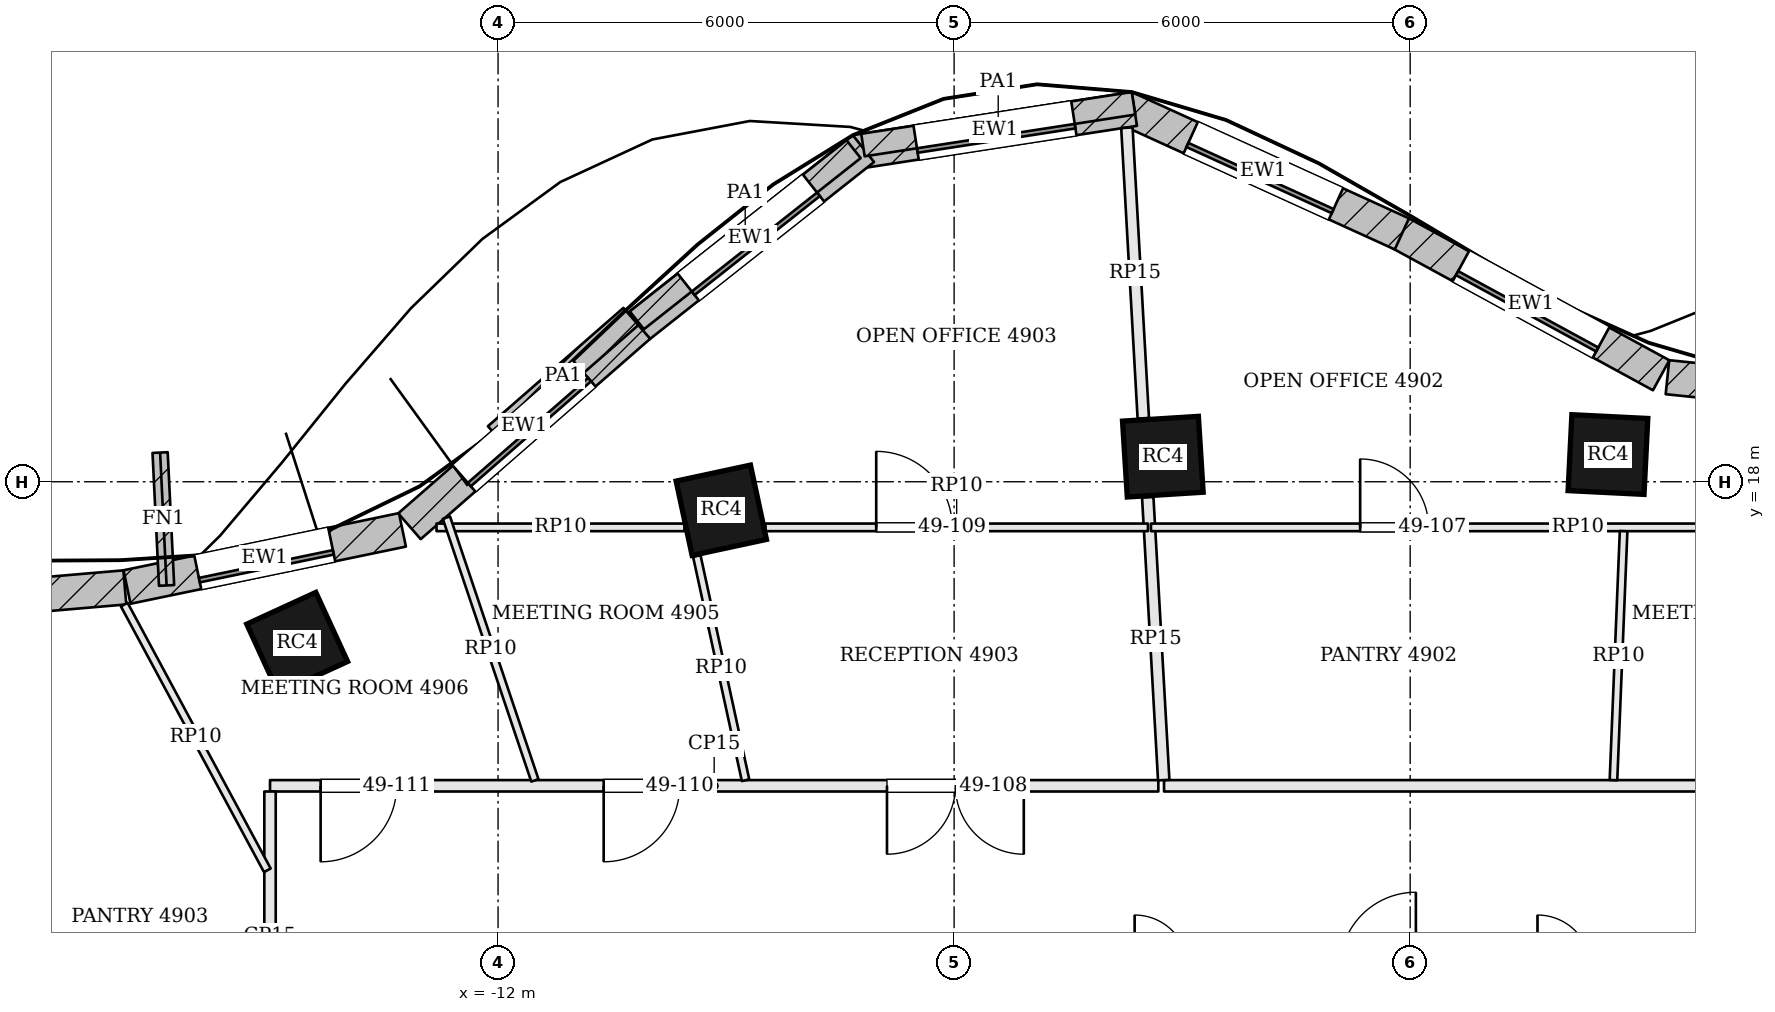
"""IFC4 building model, lengths in metres.
Left out: names, types, materials, properties, quantities, classifications, styles, units other than length and angle.
Written with IfcOpenShell. Run it as: python <this file> out.ifc"""

import sys

from ifc_helpers import new_model, si_unit, direction, frame, frame_2d, origin, origin_2d, place, context, subcontext, project, spatial, rectangle, extrude, element, fill, save


model = new_model("IFC4")
c1 = context("Model", 3, precision=1e-05, world=origin(), true_north=direction((0.0, 1.0)))
c2 = subcontext(c1, "Body", "Model", "MODEL_VIEW")
j1 = project(units=[si_unit("LENGTHUNIT", "METRE"), si_unit("PLANEANGLEUNIT", "RADIAN")], contexts=[c1])
p1 = place(None, origin())
s1 = spatial("IfcSite", under=j1, at=p1, CompositionType="ELEMENT")
p2 = place(p1, origin())
s2 = spatial("IfcBuilding", under=s1, at=p2, CompositionType="ELEMENT")
p3 = place(p2, frame((0.0, 0.0, 201.3)))
s3 = spatial("IfcBuildingStorey", under=s2, at=p3, CompositionType="ELEMENT", Elevation=201.3)
for number, where, z_axis, x_axis in (
    (1, (2.602, 18.358, 0.0), (0.0, 0.0, 1.0), (-0.999, 0.05, 0.0)),
    (2, (-3.254, 18.33, 0.0), (0.0, 0.0, 1.0), (-0.998, -0.063, 0.0)),
    (3, (-9.063, 17.625, 0.0), (0.0, 0.0, 1.0), (-0.978, -0.21, 0.0)),
    (4, (-14.643, 15.881, 0.0), (0.0, 0.0, 1.0), (-0.909, -0.417, 0.0)),
):
    element("IfcColumn", number, at=place(p3, frame(where, z_axis=z_axis, x_axis=x_axis)), inside=s3, PredefinedType="COLUMN", context=c2, shape_type="SweptSolid", body=[
        extrude(rectangle(XDim=1.0, YDim=1.0, at=origin_2d()), origin(), (0.0, 0.0, 1.0), 3.9),
    ])
p4 = place(p3, frame((6.04, 19.101, 0.0), z_axis=(0.0, 0.0, 1.0), x_axis=(-0.994675968472, 0.103052014752, 0.0)))
e5 = element("IfcWall", 5, at=p4, inside=s3, PredefinedType="SOLIDWALL", context=c2, shape_type="SweptSolid", body=[
    extrude(rectangle(XDim=2.67, YDim=0.45, at=frame_2d((1.335, 0.0))), origin(), (0.0, 0.0, 1.0), 3.7),
])
p5 = place(p4, frame((0.435, 0.0, 0.9)))
e6 = element("IfcOpeningElement", 6, at=p5, cuts=e5, PredefinedType="OPENING", context=c2, shape_type="SweptSolid", body=[
    extrude(rectangle(XDim=1.8, YDim=2.3, at=frame_2d((0.9, 1.15))), frame((0.0, 0.235, 0.0), z_axis=(0.0, -1.0, 0.0), x_axis=(1.0, 0.0, 0.0)), (0.0, 0.0, 1.0), 0.47),
])
p6 = place(p3, frame((3.302, 19.401, 0.0), z_axis=(0.0, 0.0, 1.0), x_axis=(-0.878060540763, 0.47854956562, 0.0)))
e7 = element("IfcWall", 7, at=p6, inside=s3, PredefinedType="SOLIDWALL", context=c2, shape_type="SweptSolid", body=[
    extrude(rectangle(XDim=3.901, YDim=0.45, at=frame_2d((1.951, 0.0))), origin(), (0.0, 0.0, 1.0), 3.7),
])
p7 = place(p6, frame((0.901, 0.0, 0.9)))
e8 = element("IfcOpeningElement", 8, at=p7, cuts=e7, PredefinedType="OPENING", context=c2, shape_type="SweptSolid", body=[
    extrude(rectangle(XDim=2.1, YDim=2.3, at=frame_2d((1.05, 1.15))), frame((0.0, 0.235, 0.0), z_axis=(0.0, -1.0, 0.0), x_axis=(1.0, 0.0, 0.0)), (0.0, 0.0, 1.0), 0.47),
])
p8 = place(p3, frame((-0.109, 21.261, 0.0), z_axis=(0.0, 0.0, 1.0), x_axis=(-0.910040573706, 0.414519184367, 0.0)))
e9 = element("IfcWall", 9, at=p8, inside=s3, PredefinedType="SOLIDWALL", context=c2, shape_type="SweptSolid", body=[
    extrude(rectangle(XDim=4.006, YDim=0.45, at=frame_2d((2.003, 0.0))), origin(), (0.0, 0.0, 1.0), 3.7),
])
p9 = place(p8, frame((0.953, 0.0, 0.9)))
e10 = element("IfcOpeningElement", 10, at=p9, cuts=e9, PredefinedType="OPENING", context=c2, shape_type="SweptSolid", body=[
    extrude(rectangle(XDim=2.1, YDim=2.3, at=frame_2d((1.05, 1.15))), frame((0.0, 0.235, 0.0), z_axis=(0.0, -1.0, 0.0), x_axis=(1.0, 0.0, 0.0)), (0.0, 0.0, 1.0), 0.47),
])
p10 = place(p3, frame((-3.629, 22.905, 0.0), z_axis=(0.0, 0.0, 1.0), x_axis=(-0.988300084321, -0.152521943772, 0.0)))
e11 = element("IfcWall", 11, at=p10, inside=s3, PredefinedType="SOLIDWALL", context=c2, shape_type="SweptSolid", body=[
    extrude(rectangle(XDim=3.71, YDim=0.45, at=frame_2d((1.855, 0.0))), origin(), (0.0, 0.0, 1.0), 3.7),
])
p11 = place(p10, frame((0.805, 0.0, 0.9)))
e12 = element("IfcOpeningElement", 12, at=p11, cuts=e11, PredefinedType="OPENING", context=c2, shape_type="SweptSolid", body=[
    extrude(rectangle(XDim=2.1, YDim=2.3, at=frame_2d((1.05, 1.15))), frame((0.0, 0.235, 0.0), z_axis=(0.0, -1.0, 0.0), x_axis=(1.0, 0.0, 0.0)), (0.0, 0.0, 1.0), 0.47),
])
p12 = place(p3, frame((-7.193, 22.383, 0.0), z_axis=(0.0, 0.0, 1.0), x_axis=(-0.784803291184, -0.619744942816, 0.0)))
e13 = element("IfcWall", 13, at=p12, inside=s3, PredefinedType="SOLIDWALL", context=c2, shape_type="SweptSolid", body=[
    extrude(rectangle(XDim=3.775, YDim=0.45, at=frame_2d((1.887, 0.0))), origin(), (0.0, 0.0, 1.0), 3.7),
])
p13 = place(p12, frame((0.837, 0.0, 0.9)))
e14 = element("IfcOpeningElement", 14, at=p13, cuts=e13, PredefinedType="OPENING", context=c2, shape_type="SweptSolid", body=[
    extrude(rectangle(XDim=2.1, YDim=2.3, at=frame_2d((1.05, 1.15))), frame((0.0, 0.235, 0.0), z_axis=(0.0, -1.0, 0.0), x_axis=(1.0, 0.0, 0.0)), (0.0, 0.0, 1.0), 0.47),
])
p14 = place(p3, frame((-10.146, 20.051, 0.0), z_axis=(0.0, 0.0, 1.0), x_axis=(-0.753278140428, -0.657702093013, 0.0)))
e15 = element("IfcWall", 15, at=p14, inside=s3, PredefinedType="SOLIDWALL", context=c2, shape_type="SweptSolid", body=[
    extrude(rectangle(XDim=4.008, YDim=0.45, at=frame_2d((2.004, 0.0))), origin(), (0.0, 0.0, 1.0), 3.7),
])
p15 = place(p14, frame((0.954, 0.0, 0.9)))
e16 = element("IfcOpeningElement", 16, at=p15, cuts=e15, PredefinedType="OPENING", context=c2, shape_type="SweptSolid", body=[
    extrude(rectangle(XDim=2.1, YDim=2.3, at=frame_2d((1.05, 1.15))), frame((0.0, 0.235, 0.0), z_axis=(0.0, -1.0, 0.0), x_axis=(1.0, 0.0, 0.0)), (0.0, 0.0, 1.0), 0.47),
])
p16 = place(p3, frame((-13.258, 17.367, 0.0), z_axis=(0.0, 0.0, 1.0), x_axis=(-0.97914968674, -0.203140077183, 0.0)))
e17 = element("IfcWall", 17, at=p16, inside=s3, PredefinedType="SOLIDWALL", context=c2, shape_type="SweptSolid", body=[
    extrude(rectangle(XDim=3.7, YDim=0.45, at=frame_2d((1.85, 0.0))), origin(), (0.0, 0.0, 1.0), 3.7),
])
p17 = place(p16, frame((0.95, 0.0, 0.9)))
e18 = element("IfcOpeningElement", 18, at=p17, cuts=e17, PredefinedType="OPENING", context=c2, shape_type="SweptSolid", body=[
    extrude(rectangle(XDim=1.8, YDim=2.3, at=frame_2d((0.9, 1.15))), frame((0.0, 0.235, 0.0), z_axis=(0.0, -1.0, 0.0), x_axis=(1.0, 0.0, 0.0)), (0.0, 0.0, 1.0), 0.47),
])
p18 = place(p3, frame((-16.91, 16.61, 0.0), z_axis=(0.0, 0.0, 1.0), x_axis=(-0.996333165816, -0.085558299972, 0.0)))
e19 = element("IfcWall", 19, at=p18, inside=s3, PredefinedType="SOLIDWALL", context=c2, shape_type="SweptSolid", body=[
    extrude(rectangle(XDim=5.596, YDim=0.45, at=frame_2d((2.798, 0.0))), origin(), (0.0, 0.0, 1.0), 3.7),
])
p19 = place(p18, frame((1.748, 0.0, 0.9)))
e20 = element("IfcOpeningElement", 20, at=p19, cuts=e19, PredefinedType="OPENING", context=c2, shape_type="SweptSolid", body=[
    extrude(rectangle(XDim=2.1, YDim=2.3, at=frame_2d((1.05, 1.15))), frame((0.0, 0.235, 0.0), z_axis=(0.0, -1.0, 0.0), x_axis=(1.0, 0.0, 0.0)), (0.0, 0.0, 1.0), 0.47),
])
p20 = place(p3, frame((-16.361, 16.636, 0.0), z_axis=(0.0, 0.0, 1.0), x_axis=(-0.048552811097, 0.998820616795, 0.0)))
e21 = element("IfcWall", 21, at=p20, inside=s3, PredefinedType="SOLIDWALL", context=c2, shape_type="SweptSolid", body=[
    extrude(rectangle(XDim=1.75, YDim=0.2, at=frame_2d((0.875, 0.0))), origin(), (0.0, 0.0, 1.0), 3.7),
])
p21 = place(p3, frame((-3.64, 22.979, 3.9), z_axis=(0.0, 0.0, 1.0), x_axis=(-0.988299486994, -0.152525814235, 0.0)))
e22 = element("IfcWall", 22, at=p21, inside=s3, PredefinedType="PARAPET", context=c2, shape_type="SweptSolid", body=[
    extrude(rectangle(XDim=3.602, YDim=0.3, at=frame_2d((1.801, 0.0))), origin(), (0.0, 0.0, 1.0), 1.1),
])
p22 = place(p3, frame((-7.323, 22.376, 3.9), z_axis=(0.0, 0.0, 1.0), x_axis=(-0.784819122577, -0.61972489448, 0.0)))
e23 = element("IfcWall", 23, at=p22, inside=s3, PredefinedType="PARAPET", context=c2, shape_type="SweptSolid", body=[
    extrude(rectangle(XDim=3.633, YDim=0.3, at=frame_2d((1.817, 0.0))), origin(), (0.0, 0.0, 1.0), 1.1),
])
p23 = place(p3, frame((-10.252, 20.174, 3.9), z_axis=(0.0, 0.0, 1.0), x_axis=(-0.753260147018, -0.657722700622, 0.0)))
e24 = element("IfcWall", 24, at=p23, inside=s3, PredefinedType="PARAPET", context=c2, shape_type="SweptSolid", body=[
    extrude(rectangle(XDim=2.366, YDim=0.3, at=frame_2d((1.183, 0.0))), origin(), (0.0, 0.0, 1.0), 1.1),
])
p24 = place(p3, frame((12.494, 14.0, 0.0), z_axis=(0.0, 0.0, 1.0), x_axis=(-1.0, 0.0, 0.0)))
e25 = element("IfcWall", 25, at=p24, inside=s3, PredefinedType="PARTITIONING", context=c2, shape_type="SweptSolid", body=[
    extrude(rectangle(XDim=15.733, YDim=0.15, at=frame_2d((7.866, 0.0))), origin(), (0.0, 0.0, 1.0), 3.084),
])
p25 = place(p24, frame((2.371, 0.0, 0.0)))
e26 = element("IfcOpeningElement", 26, at=p25, cuts=e25, PredefinedType="OPENING", context=c2, shape_type="SweptSolid", body=[
    extrude(rectangle(XDim=1.8, YDim=2.1, at=frame_2d((0.9, 1.05))), frame((0.0, 0.085, 0.0), z_axis=(0.0, -1.0, 0.0), x_axis=(1.0, 0.0, 0.0)), (0.0, 0.0, 1.0), 0.17),
])
p26 = place(p24, frame((7.72, 0.0, 0.0)))
e27 = element("IfcOpeningElement", 27, at=p26, cuts=e25, PredefinedType="OPENING", context=c2, shape_type="SweptSolid", body=[
    extrude(rectangle(XDim=1.0, YDim=2.4, at=frame_2d((0.5, 1.2))), frame((0.0, 0.085, 0.0), z_axis=(0.0, -1.0, 0.0), x_axis=(1.0, 0.0, 0.0)), (0.0, 0.0, 1.0), 0.17),
])
p27 = place(p3, frame((-3.727, 22.657, 0.0), z_axis=(0.0, 0.0, 1.0), x_axis=(0.056374181452, -0.998409711324, 0.0)))
e28 = element("IfcWall", 28, at=p27, inside=s3, PredefinedType="PARTITIONING", context=c2, shape_type="SweptSolid", body=[
    extrude(rectangle(XDim=3.828, YDim=0.15, at=frame_2d((1.914, 0.0))), origin(), (0.0, 0.0, 1.0), 3.084),
])
p28 = place(p3, frame((-3.452, 17.796, 0.0), z_axis=(0.0, 0.0, 1.0), x_axis=(0.056329758448, -0.998412218632, 0.0)))
e29 = element("IfcWall", 29, at=p28, inside=s3, PredefinedType="PARTITIONING", context=c2, shape_type="SweptSolid", body=[
    extrude(rectangle(XDim=3.727, YDim=0.15, at=frame_2d((1.864, 0.0))), origin(), (0.0, 0.0, 1.0), 3.084),
])
p29 = place(p3, frame((-3.313, 14.0, 0.0), z_axis=(0.0, 0.0, 1.0), x_axis=(-1.0, 0.0, 0.0)))
e30 = element("IfcWall", 30, at=p29, inside=s3, PredefinedType="PARTITIONING", context=c2, shape_type="SweptSolid", body=[
    extrude(rectangle(XDim=11.687, YDim=0.15, at=frame_2d((5.843, 0.0))), origin(), (0.0, 0.0, 1.0), 3.084),
])
p30 = place(p29, frame((1.77, 0.0, 0.0)))
e31 = element("IfcOpeningElement", 31, at=p30, cuts=e30, PredefinedType="OPENING", context=c2, shape_type="SweptSolid", body=[
    extrude(rectangle(XDim=1.8, YDim=2.1, at=frame_2d((0.9, 1.05))), frame((0.0, 0.085, 0.0), z_axis=(0.0, -1.0, 0.0), x_axis=(1.0, 0.0, 0.0)), (0.0, 0.0, 1.0), 0.17),
])
p31 = place(p29, frame((6.297, 0.0, 0.0)))
e32 = element("IfcOpeningElement", 32, at=p31, cuts=e30, PredefinedType="OPENING", context=c2, shape_type="SweptSolid", body=[
    extrude(rectangle(XDim=1.0, YDim=2.4, at=frame_2d((0.5, 1.2))), frame((0.0, 0.085, 0.0), z_axis=(0.0, -1.0, 0.0), x_axis=(1.0, 0.0, 0.0)), (0.0, 0.0, 1.0), 0.17),
])
p32 = place(p29, frame((10.021, 0.0, 0.0)))
e33 = element("IfcOpeningElement", 33, at=p32, cuts=e30, PredefinedType="OPENING", context=c2, shape_type="SweptSolid", body=[
    extrude(rectangle(XDim=1.0, YDim=2.4, at=frame_2d((0.5, 1.2))), frame((0.0, 0.085, 0.0), z_axis=(0.0, -1.0, 0.0), x_axis=(1.0, 0.0, 0.0)), (0.0, 0.0, 1.0), 0.17),
])
p33 = place(p3, frame((-15.0, 13.925, 0.0), z_axis=(0.0, 0.0, 1.0), x_axis=(0.0, -1.0, 0.0)))
e34 = element("IfcWall", 34, at=p33, inside=s3, PredefinedType="PARTITIONING", context=c2, shape_type="SweptSolid", body=[
    extrude(rectangle(XDim=3.803, YDim=0.15, at=frame_2d((1.902, 0.0))), origin(), (0.0, 0.0, 1.0), 3.084),
])
p34 = place(p33, frame((1.85, 0.0, 0.0)))
e35 = element("IfcOpeningElement", 35, at=p34, cuts=e34, PredefinedType="OPENING", context=c2, shape_type="SweptSolid", body=[
    extrude(rectangle(XDim=1.0, YDim=2.1, at=frame_2d((0.5, 1.05))), frame((0.0, 0.085, 0.0), z_axis=(0.0, -1.0, 0.0), x_axis=(1.0, 0.0, 0.0)), (0.0, 0.0, 1.0), 0.17),
])
p35 = place(p3, frame((-19.21, 12.435, 0.0), z_axis=(0.0, 0.0, 1.0), x_axis=(0.663120249496, -0.748512882125, 0.0)))
e36 = element("IfcWall", 36, at=p35, inside=s3, PredefinedType="PARTITIONING", context=c2, shape_type="SweptSolid", body=[
    extrude(rectangle(XDim=4.414, YDim=0.15, at=frame_2d((2.207, 0.0))), origin(), (0.0, 0.0, 1.0), 3.084),
])
p36 = place(p3, frame((-3.41, 17.4, 0.0), z_axis=(0.0, 0.0, 1.0), x_axis=(1.0, 0.0, 0.0)))
e37 = element("IfcWall", 37, at=p36, inside=s3, PredefinedType="PARTITIONING", context=c2, shape_type="SweptSolid", body=[
    extrude(rectangle(XDim=11.235, YDim=0.1, at=frame_2d((5.617, 0.0))), origin(), (0.0, 0.0, 1.0), 3.084),
])
p37 = place(p36, frame((2.752, 0.0, 0.0)))
e38 = element("IfcOpeningElement", 38, at=p37, cuts=e37, PredefinedType="OPENING", context=c2, shape_type="SweptSolid", body=[
    extrude(rectangle(XDim=0.9, YDim=2.1, at=frame_2d((0.45, 1.05))), frame((0.0, 0.06, 0.0), z_axis=(0.0, -1.0, 0.0), x_axis=(1.0, 0.0, 0.0)), (0.0, 0.0, 1.0), 0.12),
])
p38 = place(p3, frame((2.675, 14.075, 0.0), z_axis=(0.0, 0.0, 1.0), x_axis=(0.040667038657, 0.999172753815, 0.0)))
e39 = element("IfcWall", 39, at=p38, inside=s3, PredefinedType="PARTITIONING", context=c2, shape_type="SweptSolid", body=[
    extrude(rectangle(XDim=3.278, YDim=0.1, at=frame_2d((1.639, 0.0))), origin(), (0.0, 0.0, 1.0), 3.084),
])
p39 = place(p3, frame((-12.81, 17.4, 0.0), z_axis=(0.0, 0.0, 1.0), x_axis=(1.0, 0.0, 0.0)))
e40 = element("IfcWall", 40, at=p39, inside=s3, PredefinedType="PARTITIONING", context=c2, shape_type="SweptSolid", body=[
    extrude(rectangle(XDim=3.263, YDim=0.1, at=frame_2d((1.632, 0.0))), origin(), (0.0, 0.0, 1.0), 3.084),
])
p40 = place(p3, frame((-8.483, 17.4, 0.0), z_axis=(0.0, 0.0, 1.0), x_axis=(1.0, 0.0, 0.0)))
e41 = element("IfcWall", 41, at=p40, inside=s3, PredefinedType="PARTITIONING", context=c2, shape_type="SweptSolid", body=[
    extrude(rectangle(XDim=5.032, YDim=0.1, at=frame_2d((2.516, 0.0))), origin(), (0.0, 0.0, 1.0), 3.084),
])
p41 = place(p40, frame((1.458, 0.0, 0.0)))
e42 = element("IfcOpeningElement", 42, at=p41, cuts=e41, PredefinedType="OPENING", context=c2, shape_type="SweptSolid", body=[
    extrude(rectangle(XDim=1.0, YDim=2.1, at=frame_2d((0.5, 1.05))), frame((0.0, 0.06, 0.0), z_axis=(0.0, -1.0, 0.0), x_axis=(1.0, 0.0, 0.0)), (0.0, 0.0, 1.0), 0.12),
])
p42 = place(p3, frame((-8.744, 14.073, 0.0), z_axis=(0.0, 0.0, 1.0), x_axis=(-0.21249342495, 0.977162496391, 0.0)))
e43 = element("IfcWall", 43, at=p42, inside=s3, PredefinedType="PARTITIONING", context=c2, shape_type="SweptSolid", body=[
    extrude(rectangle(XDim=3.019, YDim=0.1, at=frame_2d((1.51, 0.0))), origin(), (0.0, 0.0, 1.0), 3.084),
])
p43 = place(p3, frame((-11.515, 14.071, 0.0), z_axis=(0.0, 0.0, 1.0), x_axis=(-0.31905751642, 0.947735353997, 0.0)))
e44 = element("IfcWall", 44, at=p43, inside=s3, PredefinedType="PARTITIONING", context=c2, shape_type="SweptSolid", body=[
    extrude(rectangle(XDim=3.648, YDim=0.1, at=frame_2d((1.824, 0.0))), origin(), (0.0, 0.0, 1.0), 3.084),
])
p44 = place(p3, frame((-15.036, 12.888, 0.0), z_axis=(0.0, 0.0, 1.0), x_axis=(-0.474066818375, 0.880488870864, 0.0)))
e45 = element("IfcWall", 45, at=p44, inside=s3, PredefinedType="PARTITIONING", context=c2, shape_type="SweptSolid", body=[
    extrude(rectangle(XDim=3.97, YDim=0.1, at=frame_2d((1.985, 0.0))), origin(), (0.0, 0.0, 1.0), 3.084),
])
p45 = place(p7, origin())
e46 = element("IfcWindow", 46, at=p45, inside=s3, PartitioningType="SINGLE_PANEL", PredefinedType="WINDOW", context=c2, shape_type="SweptSolid", body=[
    extrude(rectangle(XDim=2.1, YDim=2.3, at=frame_2d((1.05, 1.15))), frame((0.0, 0.135, 0.0), z_axis=(0.0, -1.0, 0.0), x_axis=(1.0, 0.0, 0.0)), (0.0, 0.0, 1.0), 0.06),
])
fill(e8, e46)
p46 = place(p9, origin())
e47 = element("IfcWindow", 47, at=p46, inside=s3, PartitioningType="SINGLE_PANEL", PredefinedType="WINDOW", context=c2, shape_type="SweptSolid", body=[
    extrude(rectangle(XDim=2.1, YDim=2.3, at=frame_2d((1.05, 1.15))), frame((0.0, 0.135, 0.0), z_axis=(0.0, -1.0, 0.0), x_axis=(1.0, 0.0, 0.0)), (0.0, 0.0, 1.0), 0.06),
])
fill(e10, e47)
p47 = place(p11, origin())
e48 = element("IfcWindow", 48, at=p47, inside=s3, PartitioningType="SINGLE_PANEL", PredefinedType="WINDOW", context=c2, shape_type="SweptSolid", body=[
    extrude(rectangle(XDim=2.1, YDim=2.3, at=frame_2d((1.05, 1.15))), frame((0.0, 0.135, 0.0), z_axis=(0.0, -1.0, 0.0), x_axis=(1.0, 0.0, 0.0)), (0.0, 0.0, 1.0), 0.06),
])
fill(e12, e48)
p48 = place(p13, origin())
e49 = element("IfcWindow", 49, at=p48, inside=s3, PartitioningType="SINGLE_PANEL", PredefinedType="WINDOW", context=c2, shape_type="SweptSolid", body=[
    extrude(rectangle(XDim=2.1, YDim=2.3, at=frame_2d((1.05, 1.15))), frame((0.0, 0.135, 0.0), z_axis=(0.0, -1.0, 0.0), x_axis=(1.0, 0.0, 0.0)), (0.0, 0.0, 1.0), 0.06),
])
fill(e14, e49)
p49 = place(p15, origin())
e50 = element("IfcWindow", 50, at=p49, inside=s3, PartitioningType="SINGLE_PANEL", PredefinedType="WINDOW", context=c2, shape_type="SweptSolid", body=[
    extrude(rectangle(XDim=2.1, YDim=2.3, at=frame_2d((1.05, 1.15))), frame((0.0, 0.135, 0.0), z_axis=(0.0, -1.0, 0.0), x_axis=(1.0, 0.0, 0.0)), (0.0, 0.0, 1.0), 0.06),
])
fill(e16, e50)
p50 = place(p17, origin())
e51 = element("IfcWindow", 51, at=p50, inside=s3, PartitioningType="SINGLE_PANEL", PredefinedType="WINDOW", context=c2, shape_type="SweptSolid", body=[
    extrude(rectangle(XDim=1.8, YDim=2.3, at=frame_2d((0.9, 1.15))), frame((0.0, 0.135, 0.0), z_axis=(0.0, -1.0, 0.0), x_axis=(1.0, 0.0, 0.0)), (0.0, 0.0, 1.0), 0.06),
])
fill(e18, e51)
p51 = place(p37, origin())
e52 = element("IfcDoor", 52, at=p51, inside=s3, OperationType="SINGLE_SWING_LEFT", PredefinedType="DOOR", context=c2, shape_type="SweptSolid", body=[
    extrude(rectangle(XDim=0.9, YDim=2.1, at=frame_2d((0.45, 1.05))), frame((0.0, 0.025, 0.0), z_axis=(0.0, -1.0, 0.0), x_axis=(1.0, 0.0, 0.0)), (0.0, 0.0, 1.0), 0.05),
])
fill(e38, e52)
p52 = place(p30, origin())
e53 = element("IfcDoor", 53, at=p52, inside=s3, OperationType="DOUBLE_DOOR_SINGLE_SWING", PredefinedType="DOOR", context=c2, shape_type="SweptSolid", body=[
    extrude(rectangle(XDim=1.8, YDim=2.1, at=frame_2d((0.9, 1.05))), frame((0.0, 0.025, 0.0), z_axis=(0.0, -1.0, 0.0), x_axis=(1.0, 0.0, 0.0)), (0.0, 0.0, 1.0), 0.05),
])
fill(e31, e53)
p53 = place(p41, origin())
e54 = element("IfcDoor", 54, at=p53, inside=s3, OperationType="SINGLE_SWING_LEFT", PredefinedType="DOOR", context=c2, shape_type="SweptSolid", body=[
    extrude(rectangle(XDim=1.0, YDim=2.1, at=frame_2d((0.5, 1.05))), frame((0.0, 0.025, 0.0), z_axis=(0.0, -1.0, 0.0), x_axis=(1.0, 0.0, 0.0)), (0.0, 0.0, 1.0), 0.05),
])
fill(e42, e54)
p54 = place(p31, origin())
e55 = element("IfcDoor", 55, at=p54, inside=s3, OperationType="SINGLE_SWING_RIGHT", PredefinedType="DOOR", context=c2, shape_type="SweptSolid", body=[
    extrude(rectangle(XDim=1.0, YDim=2.4, at=frame_2d((0.5, 1.2))), frame((0.0, 0.025, 0.0), z_axis=(0.0, -1.0, 0.0), x_axis=(1.0, 0.0, 0.0)), (0.0, 0.0, 1.0), 0.05),
])
fill(e32, e55)
p55 = place(p32, origin())
e56 = element("IfcDoor", 56, at=p55, inside=s3, OperationType="SINGLE_SWING_RIGHT", PredefinedType="DOOR", context=c2, shape_type="SweptSolid", body=[
    extrude(rectangle(XDim=1.0, YDim=2.4, at=frame_2d((0.5, 1.2))), frame((0.0, 0.025, 0.0), z_axis=(0.0, -1.0, 0.0), x_axis=(1.0, 0.0, 0.0)), (0.0, 0.0, 1.0), 0.05),
])
fill(e33, e56)
p56 = place(p34, origin())
e57 = element("IfcDoor", 57, at=p56, inside=s3, OperationType="SINGLE_SWING_RIGHT", PredefinedType="DOOR", context=c2, shape_type="SweptSolid", body=[
    extrude(rectangle(XDim=1.0, YDim=2.1, at=frame_2d((0.5, 1.05))), frame((0.0, 0.025, 0.0), z_axis=(0.0, -1.0, 0.0), x_axis=(1.0, 0.0, 0.0)), (0.0, 0.0, 1.0), 0.05),
])
fill(e35, e57)
save(model, sys.argv[1])
